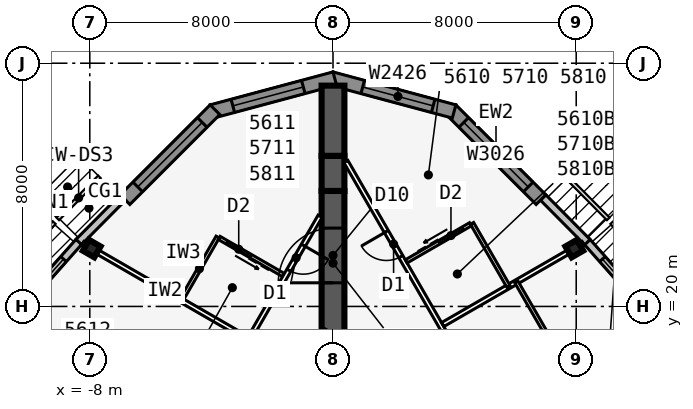
"""IFC4 building model, lengths in metres.
Left out: names, types, materials, properties, quantities, classifications, styles, units other than length and angle.
Written with IfcOpenShell. Run it as: python <this file> out.ifc"""

import sys

from ifc_helpers import new_model, si_unit, direction, frame, frame_2d, origin, origin_2d, place, context, subcontext, project, spatial, polyline, rectangle, i_section, outline, extrude, element, fill, save


model = new_model("IFC4")
c1 = context("Model", 3, precision=1e-05, world=origin(), true_north=direction((0.0, 1.0)))
c2 = subcontext(c1, "Body", "Model", "MODEL_VIEW")
j1 = project(units=[si_unit("LENGTHUNIT", "METRE"), si_unit("PLANEANGLEUNIT", "RADIAN")], contexts=[c1])
p1 = place(None, origin())
s1 = spatial("IfcSite", under=j1, at=p1, CompositionType="ELEMENT")
p2 = place(p1, origin())
s2 = spatial("IfcBuilding", under=s1, at=p2, CompositionType="ELEMENT")
p3 = place(p2, frame((0.0, 0.0, 211.7)))
s3 = spatial("IfcBuildingStorey", under=s2, at=p3, CompositionType="ELEMENT", Elevation=211.7)
p4 = place(p3, frame((16.5, -9.526, 0.0), z_axis=(0.0, 0.0, 1.0), x_axis=(-0.499999749417, 0.866025548458, 0.0)))
e1 = element("IfcWall", 1, at=p4, inside=s3, PredefinedType="SHEAR", context=c2, shape_type="SweptSolid", body=[
    extrude(rectangle(XDim=33.0, YDim=0.75, at=frame_2d((16.5, 0.0))), origin(), (0.0, 0.0, 1.0), 3.6),
])
p5 = place(p4, frame((14.15, 0.0, 0.0)))
e2 = element("IfcOpeningElement", 2, at=p5, cuts=e1, PredefinedType="OPENING", context=c2, shape_type="SweptSolid", body=[
    extrude(rectangle(XDim=1.8, YDim=2.13, at=frame_2d((0.9, 1.065))), frame((0.0, 0.385, 0.0), z_axis=(0.0, -1.0, 0.0), x_axis=(1.0, 0.0, 0.0)), (0.0, 0.0, 1.0), 0.77),
])
p6 = place(p4, frame((12.6, 0.0, 0.0)))
e3 = element("IfcOpeningElement", 3, at=p6, cuts=e1, PredefinedType="OPENING", context=c2, shape_type="SweptSolid", body=[
    extrude(rectangle(XDim=1.0, YDim=2.13, at=frame_2d((0.5, 1.065))), frame((0.0, 0.385, 0.0), z_axis=(0.0, -1.0, 0.0), x_axis=(1.0, 0.0, 0.0)), (0.0, 0.0, 1.0), 0.77),
])
p7 = place(p3, frame((0.0, 19.052, 0.0), z_axis=(0.0, 0.0, 1.0), x_axis=(-0.499999749417, -0.866025548458, 0.0)))
e4 = element("IfcWall", 4, at=p7, inside=s3, PredefinedType="SHEAR", context=c2, shape_type="SweptSolid", body=[
    extrude(rectangle(XDim=33.0, YDim=0.75, at=frame_2d((16.5, 0.0))), origin(), (0.0, 0.0, 1.0), 3.6),
])
p8 = place(p7, frame((14.15, 0.0, 0.0)))
e5 = element("IfcOpeningElement", 5, at=p8, cuts=e4, PredefinedType="OPENING", context=c2, shape_type="SweptSolid", body=[
    extrude(rectangle(XDim=1.8, YDim=2.13, at=frame_2d((0.9, 1.065))), frame((0.0, 0.385, 0.0), z_axis=(0.0, -1.0, 0.0), x_axis=(1.0, 0.0, 0.0)), (0.0, 0.0, 1.0), 0.77),
])
p9 = place(p7, frame((12.6, 0.0, 0.0)))
e6 = element("IfcOpeningElement", 6, at=p9, cuts=e4, PredefinedType="OPENING", context=c2, shape_type="SweptSolid", body=[
    extrude(rectangle(XDim=1.0, YDim=2.13, at=frame_2d((0.5, 1.065))), frame((0.0, 0.385, 0.0), z_axis=(0.0, -1.0, 0.0), x_axis=(1.0, 0.0, 0.0)), (0.0, 0.0, 1.0), 0.77),
])
p10 = place(p3, frame((0.0, 19.052, 0.0), z_axis=(0.0, 0.0, 1.0), x_axis=(0.0, 1.0, 0.0)))
e7 = element("IfcWall", 7, at=p10, inside=s3, PredefinedType="SHEAR", context=c2, shape_type="SweptSolid", body=[
    extrude(rectangle(XDim=4.746, YDim=0.75, at=frame_2d((2.373, 0.0))), origin(), (0.0, 0.0, 1.0), 3.6),
])
p11 = place(p10, frame((1.725, 0.0, 0.0)))
e8 = element("IfcOpeningElement", 8, at=p11, cuts=e7, PredefinedType="OPENING", context=c2, shape_type="SweptSolid", body=[
    extrude(rectangle(XDim=1.8, YDim=2.13, at=frame_2d((0.9, 1.065))), frame((0.0, 0.385, 0.0), z_axis=(0.0, -1.0, 0.0), x_axis=(1.0, 0.0, 0.0)), (0.0, 0.0, 1.0), 0.77),
])
p12 = place(p3, frame((0.0, 23.799, 0.0), z_axis=(0.0, 0.0, 1.0), x_axis=(0.0, 1.0, 0.0)))
e9 = element("IfcWall", 9, at=p12, inside=s3, PredefinedType="SHEAR", context=c2, shape_type="SweptSolid", body=[
    extrude(rectangle(XDim=1.155, YDim=0.75, at=frame_2d((0.577, 0.0))), origin(), (0.0, 0.0, 1.0), 3.6),
])
p13 = place(p3, frame((0.0, 24.953, 0.0), z_axis=(0.0, 0.0, 1.0), x_axis=(0.0, 1.0, 0.0)))
e10 = element("IfcWall", 10, at=p13, inside=s3, PredefinedType="SHEAR", context=c2, shape_type="SweptSolid", body=[
    extrude(rectangle(XDim=2.309, YDim=0.75, at=frame_2d((1.155, 0.0))), origin(), (0.0, 0.0, 1.0), 3.6),
])
for number, where, z_axis, x_axis in (
    (11, (7.937, 21.903, 0.0), (0.0, 0.0, 1.0), (-0.5, 0.866, 0.0)),
    (12, (-7.937, 21.903, 0.0), (0.0, 0.0, 1.0), (-0.5, -0.866, 0.0)),
):
    element("IfcColumn", number, at=place(p3, frame(where, z_axis=z_axis, x_axis=x_axis)), inside=s3, PredefinedType="COLUMN", context=c2, shape_type="SweptSolid", body=[
        extrude(i_section(OverallWidth=0.411, OverallDepth=0.434, WebThickness=0.036, FlangeThickness=0.057, at=origin_2d()), origin(), (0.0, 0.0, 1.0), 3.6),
    ])
p14 = place(p3, frame((11.754, 18.304, 0.0), z_axis=(0.0, 0.0, 1.0), x_axis=(-0.664348996191, 0.747422511876, 0.0)))
e13 = element("IfcWall", 13, at=p14, inside=s3, PredefinedType="STANDARD", context=c2, shape_type="SweptSolid", body=[
    extrude(rectangle(XDim=5.105, YDim=0.25, at=frame_2d((2.552, 0.0))), origin(), (0.0, 0.0, 1.0), 3.435),
])
p15 = place(p14, frame((0.752, 0.0, 0.45)))
e14 = element("IfcOpeningElement", 14, at=p15, cuts=e13, PredefinedType="OPENING", context=c2, shape_type="SweptSolid", body=[
    extrude(rectangle(XDim=3.6, YDim=2.6, at=frame_2d((1.8, 1.3))), frame((0.0, 0.135, 0.0), z_axis=(0.0, -1.0, 0.0), x_axis=(1.0, 0.0, 0.0)), (0.0, 0.0, 1.0), 0.27),
])
p16 = place(p3, frame((8.368, 22.115, 0.0), z_axis=(0.0, 0.0, 1.0), x_axis=(-0.704149946111, 0.710051303352, 0.0)))
e15 = element("IfcWall", 15, at=p16, inside=s3, PredefinedType="STANDARD", context=c2, shape_type="SweptSolid", body=[
    extrude(rectangle(XDim=2.069, YDim=0.25, at=frame_2d((1.034, 0.0))), origin(), (0.0, 0.0, 1.0), 3.435),
])
p17 = place(p3, frame((6.841, 23.512, 0.0), z_axis=(0.0, 0.0, 1.0), x_axis=(-0.707106781187, 0.707106781187, 0.0)))
e16 = element("IfcWall", 16, at=p17, inside=s3, PredefinedType="SOLIDWALL", context=c2, shape_type="SweptSolid", body=[
    extrude(rectangle(XDim=4.184, YDim=0.45, at=frame_2d((2.092, 0.0))), origin(), (0.0, 0.0, 1.0), 3.435),
])
p18 = place(p17, frame((0.592, 0.0, 0.45)))
e17 = element("IfcOpeningElement", 17, at=p18, cuts=e16, PredefinedType="OPENING", context=c2, shape_type="SweptSolid", body=[
    extrude(rectangle(XDim=3.0, YDim=2.6, at=frame_2d((1.5, 1.3))), frame((0.0, 0.235, 0.0), z_axis=(0.0, -1.0, 0.0), x_axis=(1.0, 0.0, 0.0)), (0.0, 0.0, 1.0), 0.47),
])
p19 = place(p3, frame((3.983, 26.413, 0.0), z_axis=(0.0, 0.0, 1.0), x_axis=(-0.965920442324, 0.258839137498, 0.0)))
e18 = element("IfcWall", 18, at=p19, inside=s3, PredefinedType="SOLIDWALL", context=c2, shape_type="SweptSolid", body=[
    extrude(outline(polyline([(4.184, 0.225), (4.124, 0.225), (3.706, 0.113), (3.676, 0.225), (0.0, 0.225), (0.0, -0.225), (4.184, -0.225), (4.184, 0.225)])), origin(), (0.0, 0.0, 1.0), 3.435),
])
p20 = place(p19, frame((0.713, 0.0, 0.45)))
e19 = element("IfcOpeningElement", 19, at=p20, cuts=e18, PredefinedType="OPENING", context=c2, shape_type="SweptSolid", body=[
    extrude(rectangle(XDim=2.4, YDim=2.6, at=frame_2d((1.2, 1.3))), frame((0.0, 0.235, 0.0), z_axis=(0.0, -1.0, 0.0), x_axis=(1.0, 0.0, 0.0)), (0.0, 0.0, 1.0), 0.47),
])
p21 = place(p3, frame((0.058, 27.496, 0.0), z_axis=(0.0, 0.0, 1.0), x_axis=(-0.965920442324, -0.258839137498, 0.0)))
e20 = element("IfcWall", 20, at=p21, inside=s3, PredefinedType="SOLIDWALL", context=c2, shape_type="SweptSolid", body=[
    extrude(outline(polyline([(4.184, 0.225), (0.509, 0.225), (0.479, 0.113), (0.06, 0.225), (0.0, 0.225), (0.0, -0.225), (4.184, -0.225), (4.184, 0.225)])), origin(), (0.0, 0.0, 1.0), 3.435),
])
p22 = place(p21, frame((1.071, 0.0, 0.45)))
e21 = element("IfcOpeningElement", 21, at=p22, cuts=e20, PredefinedType="OPENING", context=c2, shape_type="SweptSolid", body=[
    extrude(rectangle(XDim=2.4, YDim=2.6, at=frame_2d((1.2, 1.3))), frame((0.0, 0.235, 0.0), z_axis=(0.0, -1.0, 0.0), x_axis=(1.0, 0.0, 0.0)), (0.0, 0.0, 1.0), 0.47),
])
p23 = place(p3, frame((-3.882, 26.471, 0.0), z_axis=(0.0, 0.0, 1.0), x_axis=(-0.707106781187, -0.707106781187, 0.0)))
e22 = element("IfcWall", 22, at=p23, inside=s3, PredefinedType="SOLIDWALL", context=c2, shape_type="SweptSolid", body=[
    extrude(rectangle(XDim=4.184, YDim=0.45, at=frame_2d((2.092, 0.0))), origin(), (0.0, 0.0, 1.0), 3.435),
])
p24 = place(p23, frame((0.592, 0.0, 0.45)))
e23 = element("IfcOpeningElement", 23, at=p24, cuts=e22, PredefinedType="OPENING", context=c2, shape_type="SweptSolid", body=[
    extrude(rectangle(XDim=3.0, YDim=2.6, at=frame_2d((1.5, 1.3))), frame((0.0, 0.235, 0.0), z_axis=(0.0, -1.0, 0.0), x_axis=(1.0, 0.0, 0.0)), (0.0, 0.0, 1.0), 0.47),
])
p25 = place(p3, frame((-6.911, 23.583, 0.0), z_axis=(0.0, 0.0, 1.0), x_axis=(-0.704149946111, -0.710051303352, 0.0)))
e24 = element("IfcWall", 24, at=p25, inside=s3, PredefinedType="STANDARD", context=c2, shape_type="SweptSolid", body=[
    extrude(rectangle(XDim=2.069, YDim=0.25, at=frame_2d((1.034, 0.0))), origin(), (0.0, 0.0, 1.0), 3.435),
])
p26 = place(p3, frame((-8.363, 22.12, 0.0), z_axis=(0.0, 0.0, 1.0), x_axis=(-0.664348996191, -0.747422511876, 0.0)))
e25 = element("IfcWall", 25, at=p26, inside=s3, PredefinedType="STANDARD", context=c2, shape_type="SweptSolid", body=[
    extrude(rectangle(XDim=5.105, YDim=0.25, at=frame_2d((2.552, 0.0))), origin(), (0.0, 0.0, 1.0), 3.435),
])
p27 = place(p26, frame((0.752, 0.0, 0.45)))
e26 = element("IfcOpeningElement", 26, at=p27, cuts=e25, PredefinedType="OPENING", context=c2, shape_type="SweptSolid", body=[
    extrude(rectangle(XDim=3.6, YDim=2.6, at=frame_2d((1.8, 1.3))), frame((0.0, 0.135, 0.0), z_axis=(0.0, -1.0, 0.0), x_axis=(1.0, 0.0, 0.0)), (0.0, 0.0, 1.0), 0.27),
])
p28 = place(p3, frame((21.661, -12.015, 0.0), z_axis=(0.0, 0.0, 1.0), x_axis=(-0.500000605707, 0.866025054079, 0.0)))
e27 = element("IfcWall", 27, at=p28, inside=s3, PredefinedType="PARTITIONING", context=c2, shape_type="SweptSolid", body=[
    extrude(rectangle(XDim=42.472, YDim=0.15, at=frame_2d((21.236, 0.0))), origin(), (0.0, 0.0, 1.0), 3.435),
])
p29 = place(p28, frame((2.661, 0.0, 0.0)))
e28 = element("IfcOpeningElement", 28, at=p29, cuts=e27, PredefinedType="OPENING", context=c2, shape_type="SweptSolid", body=[
    extrude(rectangle(XDim=0.95, YDim=2.13, at=frame_2d((0.475, 1.065))), frame((0.0, 0.085, 0.0), z_axis=(0.0, -1.0, 0.0), x_axis=(1.0, 0.0, 0.0)), (0.0, 0.0, 1.0), 0.17),
])
p30 = place(p28, frame((7.061, 0.0, 0.0)))
e29 = element("IfcOpeningElement", 29, at=p30, cuts=e27, PredefinedType="OPENING", context=c2, shape_type="SweptSolid", body=[
    extrude(rectangle(XDim=0.95, YDim=2.13, at=frame_2d((0.475, 1.065))), frame((0.0, 0.085, 0.0), z_axis=(0.0, -1.0, 0.0), x_axis=(1.0, 0.0, 0.0)), (0.0, 0.0, 1.0), 0.17),
])
p31 = place(p28, frame((13.861, 0.0, 0.0)))
e30 = element("IfcOpeningElement", 30, at=p31, cuts=e27, PredefinedType="OPENING", context=c2, shape_type="SweptSolid", body=[
    extrude(rectangle(XDim=0.95, YDim=2.13, at=frame_2d((0.475, 1.065))), frame((0.0, 0.085, 0.0), z_axis=(0.0, -1.0, 0.0), x_axis=(1.0, 0.0, 0.0)), (0.0, 0.0, 1.0), 0.17),
])
p32 = place(p28, frame((22.061, 0.0, 0.0)))
e31 = element("IfcOpeningElement", 31, at=p32, cuts=e27, PredefinedType="OPENING", context=c2, shape_type="SweptSolid", body=[
    extrude(rectangle(XDim=0.95, YDim=2.13, at=frame_2d((0.475, 1.065))), frame((0.0, 0.085, 0.0), z_axis=(0.0, -1.0, 0.0), x_axis=(1.0, 0.0, 0.0)), (0.0, 0.0, 1.0), 0.17),
])
p33 = place(p28, frame((28.261, 0.0, 0.0)))
e32 = element("IfcOpeningElement", 32, at=p33, cuts=e27, PredefinedType="OPENING", context=c2, shape_type="SweptSolid", body=[
    extrude(rectangle(XDim=0.95, YDim=2.13, at=frame_2d((0.475, 1.065))), frame((0.0, 0.085, 0.0), z_axis=(0.0, -1.0, 0.0), x_axis=(1.0, 0.0, 0.0)), (0.0, 0.0, 1.0), 0.17),
])
p34 = place(p28, frame((38.861, 0.0, 0.0)))
e33 = element("IfcOpeningElement", 33, at=p34, cuts=e27, PredefinedType="OPENING", context=c2, shape_type="SweptSolid", body=[
    extrude(rectangle(XDim=0.95, YDim=2.13, at=frame_2d((0.475, 1.065))), frame((0.0, 0.085, 0.0), z_axis=(0.0, -1.0, 0.0), x_axis=(1.0, 0.0, 0.0)), (0.0, 0.0, 1.0), 0.17),
])
p35 = place(p3, frame((3.608, 19.404, 0.0), z_axis=(0.0, 0.0, 1.0), x_axis=(0.866028745538, 0.499994211868, 0.0)))
e34 = element("IfcWall", 34, at=p35, inside=s3, PredefinedType="PARTITIONING", context=c2, shape_type="SweptSolid", body=[
    extrude(rectangle(XDim=5.34, YDim=0.15, at=frame_2d((2.67, 0.0))), origin(), (0.0, 0.0, 1.0), 2.589),
])
p36 = place(p3, frame((7.533, 18.205, 0.0), z_axis=(0.0, 0.0, 1.0), x_axis=(-0.499990139034, 0.866031096941, 0.0)))
e35 = element("IfcWall", 35, at=p36, inside=s3, PredefinedType="PLUMBINGWALL", context=c2, shape_type="SweptSolid", body=[
    extrude(rectangle(XDim=3.0, YDim=0.12, at=frame_2d((1.5, 0.0))), origin(), (0.0, 0.0, 1.0), 3.435),
])
p37 = place(p3, frame((5.773, 20.654, 0.0), z_axis=(0.0, 0.0, 1.0), x_axis=(-0.500001309137, 0.866024647952, 0.0)))
e36 = element("IfcWall", 36, at=p37, inside=s3, PredefinedType="PLUMBINGWALL", context=c2, shape_type="SweptSolid", body=[
    extrude(rectangle(XDim=2.4, YDim=0.12, at=frame_2d((1.2, 0.0))), origin(), (0.0, 0.0, 1.0), 3.435),
])
p38 = place(p3, frame((2.408, 21.482, 0.0), z_axis=(0.0, 0.0, 1.0), x_axis=(0.866023955769, 0.500002508028, 0.0)))
e37 = element("IfcWall", 37, at=p38, inside=s3, PredefinedType="PLUMBINGWALL", context=c2, shape_type="SweptSolid", body=[
    extrude(rectangle(XDim=2.44, YDim=0.12, at=frame_2d((1.22, 0.0))), origin(), (0.0, 0.0, 1.0), 3.435),
])
p39 = place(p38, frame((1.25, 0.0, 0.0)))
e38 = element("IfcOpeningElement", 38, at=p39, cuts=e37, PredefinedType="OPENING", context=c2, shape_type="SweptSolid", body=[
    extrude(rectangle(XDim=0.9, YDim=2.13, at=frame_2d((0.45, 1.065))), frame((0.0, 0.07, 0.0), z_axis=(0.0, -1.0, 0.0), x_axis=(1.0, 0.0, 0.0)), (0.0, 0.0, 1.0), 0.14),
])
p40 = place(p3, frame((-0.425, 22.966, 0.0), z_axis=(0.0, 0.0, 1.0), x_axis=(-0.500000265775, -0.866025250339, 0.0)))
e39 = element("IfcWall", 39, at=p40, inside=s3, PredefinedType="PARTITIONING", context=c2, shape_type="SweptSolid", body=[
    extrude(rectangle(XDim=39.354, YDim=0.15, at=frame_2d((19.677, 0.0))), origin(), (0.0, 0.0, 1.0), 3.435),
])
p41 = place(p40, frame((1.102, 0.0, 0.0)))
e40 = element("IfcOpeningElement", 40, at=p41, cuts=e39, PredefinedType="OPENING", context=c2, shape_type="SweptSolid", body=[
    extrude(rectangle(XDim=0.95, YDim=2.13, at=frame_2d((0.475, 1.065))), frame((0.0, 0.085, 0.0), z_axis=(0.0, -1.0, 0.0), x_axis=(1.0, 0.0, 0.0)), (0.0, 0.0, 1.0), 0.17),
])
p42 = place(p40, frame((6.702, 0.0, 0.0)))
e41 = element("IfcOpeningElement", 41, at=p42, cuts=e39, PredefinedType="OPENING", context=c2, shape_type="SweptSolid", body=[
    extrude(rectangle(XDim=0.95, YDim=2.13, at=frame_2d((0.475, 1.065))), frame((0.0, 0.085, 0.0), z_axis=(0.0, -1.0, 0.0), x_axis=(1.0, 0.0, 0.0)), (0.0, 0.0, 1.0), 0.17),
])
p43 = place(p40, frame((16.702, 0.0, 0.0)))
e42 = element("IfcOpeningElement", 42, at=p43, cuts=e39, PredefinedType="OPENING", context=c2, shape_type="SweptSolid", body=[
    extrude(rectangle(XDim=0.95, YDim=2.13, at=frame_2d((0.475, 1.065))), frame((0.0, 0.085, 0.0), z_axis=(0.0, -1.0, 0.0), x_axis=(1.0, 0.0, 0.0)), (0.0, 0.0, 1.0), 0.17),
])
p44 = place(p40, frame((26.102, 0.0, 0.0)))
e43 = element("IfcOpeningElement", 43, at=p44, cuts=e39, PredefinedType="OPENING", context=c2, shape_type="SweptSolid", body=[
    extrude(rectangle(XDim=0.95, YDim=2.13, at=frame_2d((0.475, 1.065))), frame((0.0, 0.085, 0.0), z_axis=(0.0, -1.0, 0.0), x_axis=(1.0, 0.0, 0.0)), (0.0, 0.0, 1.0), 0.17),
])
p45 = place(p40, frame((32.302, 0.0, 0.0)))
e44 = element("IfcOpeningElement", 44, at=p45, cuts=e39, PredefinedType="OPENING", context=c2, shape_type="SweptSolid", body=[
    extrude(rectangle(XDim=0.95, YDim=2.13, at=frame_2d((0.475, 1.065))), frame((0.0, 0.085, 0.0), z_axis=(0.0, -1.0, 0.0), x_axis=(1.0, 0.0, 0.0)), (0.0, 0.0, 1.0), 0.17),
])
p46 = place(p40, frame((37.302, 0.0, 0.0)))
e45 = element("IfcOpeningElement", 45, at=p46, cuts=e39, PredefinedType="OPENING", context=c2, shape_type="SweptSolid", body=[
    extrude(rectangle(XDim=0.95, YDim=2.13, at=frame_2d((0.475, 1.065))), frame((0.0, 0.085, 0.0), z_axis=(0.0, -1.0, 0.0), x_axis=(1.0, 0.0, 0.0)), (0.0, 0.0, 1.0), 0.17),
])
p47 = place(p3, frame((-2.829, 18.954, 0.0), z_axis=(0.0, 0.0, 1.0), x_axis=(-0.866026604282, 0.499997920671, 0.0)))
e46 = element("IfcWall", 46, at=p47, inside=s3, PredefinedType="PARTITIONING", context=c2, shape_type="SweptSolid", body=[
    extrude(rectangle(XDim=6.24, YDim=0.15, at=frame_2d((3.12, 0.0))), origin(), (0.0, 0.0, 1.0), 2.589),
])
p48 = place(p3, frame((-3.793, 22.282, 0.0), z_axis=(0.0, 0.0, 1.0), x_axis=(-0.500001309137, -0.866024647952, 0.0)))
e47 = element("IfcWall", 47, at=p48, inside=s3, PredefinedType="PLUMBINGWALL", context=c2, shape_type="SweptSolid", body=[
    extrude(rectangle(XDim=2.4, YDim=0.12, at=frame_2d((1.2, 0.0))), origin(), (0.0, 0.0, 1.0), 3.435),
])
p49 = place(p3, frame((-1.628, 21.032, 0.0), z_axis=(0.0, 0.0, 1.0), x_axis=(-0.866048967903, 0.499959183527, 0.0)))
e48 = element("IfcWall", 48, at=p49, inside=s3, PredefinedType="PLUMBINGWALL", context=c2, shape_type="SweptSolid", body=[
    extrude(rectangle(XDim=2.44, YDim=0.12, at=frame_2d((1.22, 0.0))), origin(), (0.0, 0.0, 1.0), 3.435),
])
p50 = place(p49, frame((1.25, 0.0, 0.0)))
e49 = element("IfcOpeningElement", 49, at=p50, cuts=e48, PredefinedType="OPENING", context=c2, shape_type="SweptSolid", body=[
    extrude(rectangle(XDim=0.9, YDim=2.13, at=frame_2d((0.45, 1.065))), frame((0.0, 0.07, 0.0), z_axis=(0.0, -1.0, 0.0), x_axis=(1.0, 0.0, 0.0)), (0.0, 0.0, 1.0), 0.14),
])
p51 = place(p15, origin())
e50 = element("IfcWindow", 50, at=p51, inside=s3, PartitioningType="SINGLE_PANEL", PredefinedType="WINDOW", context=c2, shape_type="SweptSolid", body=[
    extrude(rectangle(XDim=3.6, YDim=2.6, at=frame_2d((1.8, 1.3))), frame((0.0, 0.03, 0.0), z_axis=(0.0, -1.0, 0.0), x_axis=(1.0, 0.0, 0.0)), (0.0, 0.0, 1.0), 0.06),
])
fill(e14, e50)
p52 = place(p18, origin())
e51 = element("IfcWindow", 51, at=p52, inside=s3, PartitioningType="SINGLE_PANEL", PredefinedType="WINDOW", context=c2, shape_type="SweptSolid", body=[
    extrude(rectangle(XDim=3.0, YDim=2.6, at=frame_2d((1.5, 1.3))), frame((0.0, 0.03, 0.0), z_axis=(0.0, -1.0, 0.0), x_axis=(1.0, 0.0, 0.0)), (0.0, 0.0, 1.0), 0.06),
])
fill(e17, e51)
p53 = place(p20, origin())
e52 = element("IfcWindow", 52, at=p53, inside=s3, PartitioningType="SINGLE_PANEL", PredefinedType="WINDOW", context=c2, shape_type="SweptSolid", body=[
    extrude(rectangle(XDim=2.4, YDim=2.6, at=frame_2d((1.2, 1.3))), frame((0.0, 0.03, 0.0), z_axis=(0.0, -1.0, 0.0), x_axis=(1.0, 0.0, 0.0)), (0.0, 0.0, 1.0), 0.06),
])
fill(e19, e52)
p54 = place(p22, origin())
e53 = element("IfcWindow", 53, at=p54, inside=s3, PartitioningType="SINGLE_PANEL", PredefinedType="WINDOW", context=c2, shape_type="SweptSolid", body=[
    extrude(rectangle(XDim=2.4, YDim=2.6, at=frame_2d((1.2, 1.3))), frame((0.0, 0.03, 0.0), z_axis=(0.0, -1.0, 0.0), x_axis=(1.0, 0.0, 0.0)), (0.0, 0.0, 1.0), 0.06),
])
fill(e21, e53)
p55 = place(p24, origin())
e54 = element("IfcWindow", 54, at=p55, inside=s3, PartitioningType="SINGLE_PANEL", PredefinedType="WINDOW", context=c2, shape_type="SweptSolid", body=[
    extrude(rectangle(XDim=3.0, YDim=2.6, at=frame_2d((1.5, 1.3))), frame((0.0, 0.03, 0.0), z_axis=(0.0, -1.0, 0.0), x_axis=(1.0, 0.0, 0.0)), (0.0, 0.0, 1.0), 0.06),
])
fill(e23, e54)
p56 = place(p27, origin())
e55 = element("IfcWindow", 55, at=p56, inside=s3, PartitioningType="SINGLE_PANEL", PredefinedType="WINDOW", context=c2, shape_type="SweptSolid", body=[
    extrude(rectangle(XDim=3.6, YDim=2.6, at=frame_2d((1.8, 1.3))), frame((0.0, 0.03, 0.0), z_axis=(0.0, -1.0, 0.0), x_axis=(1.0, 0.0, 0.0)), (0.0, 0.0, 1.0), 0.06),
])
fill(e26, e55)
p57 = place(p39, origin())
e56 = element("IfcDoor", 56, at=p57, inside=s3, OperationType="SLIDING_TO_LEFT", PredefinedType="DOOR", context=c2, shape_type="SweptSolid", body=[
    extrude(rectangle(XDim=0.9, YDim=2.13, at=frame_2d((0.45, 1.065))), frame((0.0, 0.025, 0.0), z_axis=(0.0, -1.0, 0.0), x_axis=(1.0, 0.0, 0.0)), (0.0, 0.0, 1.0), 0.05),
])
fill(e38, e56)
p58 = place(p34, origin())
e57 = element("IfcDoor", 57, at=p58, inside=s3, OperationType="SINGLE_SWING_RIGHT", PredefinedType="DOOR", context=c2, shape_type="SweptSolid", body=[
    extrude(rectangle(XDim=0.95, YDim=2.13, at=frame_2d((0.475, 1.065))), frame((0.0, 0.025, 0.0), z_axis=(0.0, -1.0, 0.0), x_axis=(1.0, 0.0, 0.0)), (0.0, 0.0, 1.0), 0.05),
])
fill(e33, e57)
p59 = place(p50, origin())
e58 = element("IfcDoor", 58, at=p59, inside=s3, OperationType="SLIDING_TO_LEFT", PredefinedType="DOOR", context=c2, shape_type="SweptSolid", body=[
    extrude(rectangle(XDim=0.9, YDim=2.13, at=frame_2d((0.45, 1.065))), frame((0.0, 0.025, 0.0), z_axis=(0.0, -1.0, 0.0), x_axis=(1.0, 0.0, 0.0)), (0.0, 0.0, 1.0), 0.05),
])
fill(e49, e58)
p60 = place(p41, origin())
e59 = element("IfcDoor", 59, at=p60, inside=s3, OperationType="SINGLE_SWING_LEFT", PredefinedType="DOOR", context=c2, shape_type="SweptSolid", body=[
    extrude(rectangle(XDim=0.95, YDim=2.13, at=frame_2d((0.475, 1.065))), frame((0.0, 0.025, 0.0), z_axis=(0.0, -1.0, 0.0), x_axis=(1.0, 0.0, 0.0)), (0.0, 0.0, 1.0), 0.05),
])
fill(e40, e59)
p61 = place(p11, origin())
e60 = element("IfcDoor", 60, at=p61, inside=s3, OperationType="DOUBLE_DOOR_DOUBLE_SWING", PredefinedType="DOOR", context=c2, shape_type="SweptSolid", body=[
    extrude(rectangle(XDim=1.8, YDim=2.13, at=frame_2d((0.9, 1.065))), frame((0.0, 0.025, 0.0), z_axis=(0.0, -1.0, 0.0), x_axis=(1.0, 0.0, 0.0)), (0.0, 0.0, 1.0), 0.05),
])
fill(e8, e60)
save(model, sys.argv[1])
